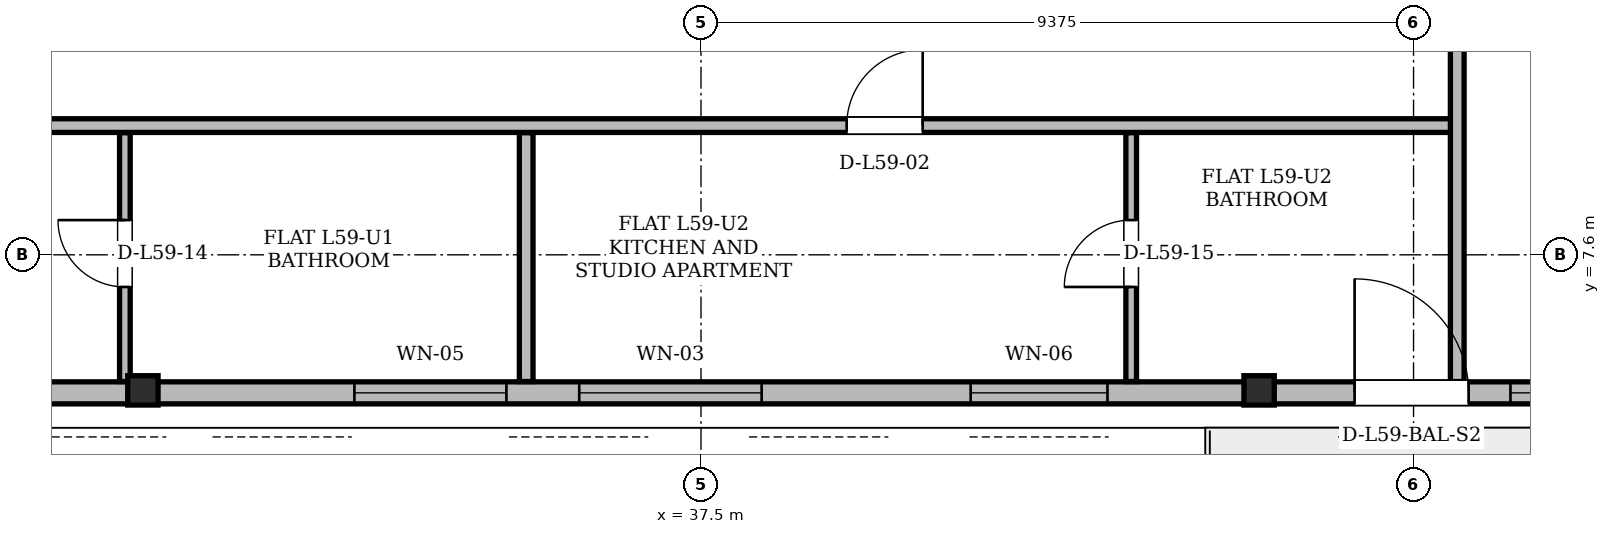
"""IFC4 building model, lengths in metres.
Left out: names, types, materials, properties, quantities, classifications, styles, units other than length and angle.
Written with IfcOpenShell. Run it as: python <this file> out.ifc"""

import sys

from ifc_helpers import new_model, si_unit, direction, frame, frame_2d, origin, origin_2d, place, context, subcontext, project, spatial, rectangle, i_section, extrude, element, fill, save


model = new_model("IFC4")
c1 = context("Model", 3, precision=1e-05, world=origin(), true_north=direction((0.0, 1.0)))
c2 = subcontext(c1, "Body", "Model", "MODEL_VIEW")
j1 = project(units=[si_unit("LENGTHUNIT", "METRE"), si_unit("PLANEANGLEUNIT", "RADIAN")], contexts=[c1])
p1 = place(None, origin())
s1 = spatial("IfcSite", under=j1, at=p1, CompositionType="ELEMENT")
p2 = place(p1, origin())
s2 = spatial("IfcBuilding", under=s1, at=p2, CompositionType="ELEMENT")
p3 = place(p2, frame((0.0, 0.0, 223.5)))
s3 = spatial("IfcBuildingStorey", under=s2, at=p3, CompositionType="ELEMENT", Elevation=223.5)
for number, where, z_axis, x_axis in (
    (1, (30.162, 5.784, 0.004), (-0.003, 0.018, 1.0), (-0.987, -0.162, 0.0)),
    (2, (44.838, 5.784, 0.004), (0.003, 0.018, 1.0), (-0.987, 0.162, 0.0)),
):
    element("IfcColumn", number, at=place(p3, frame(where, z_axis=z_axis, x_axis=x_axis)), inside=s3, PredefinedType="COLUMN", context=c2, shape_type="SweptSolid", body=[
        extrude(i_section(OverallWidth=0.399, OverallDepth=0.386, WebThickness=0.021, FlangeThickness=0.033, at=origin_2d()), origin(), (0.0, 0.0, 1.0), 3.592),
    ])
p4 = place(p3, frame((19.156, 5.784, 0.0), z_axis=(0.0, 0.0, 1.0), x_axis=(1.0, 0.0, 0.0)))
e3 = element("IfcWall", 3, at=p4, inside=s3, PredefinedType="SOLIDWALL", context=c2, shape_type="SweptSolid", body=[
    extrude(rectangle(XDim=36.688, YDim=0.29, at=frame_2d((18.344, 0.0))), origin(), (0.0, 0.0, 1.0), 2.677),
])
p5 = place(p4, frame((3.639, 0.0, 0.0)))
e4 = element("IfcOpeningElement", 4, at=p5, cuts=e3, PredefinedType="OPENING", context=c2, shape_type="SweptSolid", body=[
    extrude(rectangle(XDim=1.5, YDim=2.2, at=frame_2d((0.75, 1.1))), frame((0.0, 0.145, 0.0), z_axis=(0.0, -1.0, 0.0), x_axis=(1.0, 0.0, 0.0)), (0.0, 0.0, 1.0), 0.29),
])
p6 = place(p4, frame((26.944, 0.0, 0.0)))
e5 = element("IfcOpeningElement", 5, at=p6, cuts=e3, PredefinedType="OPENING", context=c2, shape_type="SweptSolid", body=[
    extrude(rectangle(XDim=1.5, YDim=2.2, at=frame_2d((0.75, 1.1))), frame((0.0, 0.145, 0.0), z_axis=(0.0, -1.0, 0.0), x_axis=(1.0, 0.0, 0.0)), (0.0, 0.0, 1.0), 0.29),
])
p7 = place(p4, frame((1.337, 0.0, 0.85)))
e6 = element("IfcOpeningElement", 6, at=p7, cuts=e3, PredefinedType="OPENING", context=c2, shape_type="SweptSolid", body=[
    extrude(rectangle(XDim=1.2, YDim=1.48, at=frame_2d((0.6, 0.74))), frame((0.0, 0.145, 0.0), z_axis=(0.0, -1.0, 0.0), x_axis=(1.0, 0.0, 0.0)), (0.0, 0.0, 1.0), 0.29),
])
p8 = place(p4, frame((7.342, 0.0, 0.85)))
e7 = element("IfcOpeningElement", 7, at=p8, cuts=e3, PredefinedType="OPENING", context=c2, shape_type="SweptSolid", body=[
    extrude(rectangle(XDim=2.2, YDim=1.717, at=frame_2d((1.1, 0.858))), frame((0.0, 0.145, 0.0), z_axis=(0.0, -1.0, 0.0), x_axis=(1.0, 0.0, 0.0)), (0.0, 0.0, 1.0), 0.29),
])
p9 = place(p4, frame((13.784, 0.0, 0.85)))
e8 = element("IfcOpeningElement", 8, at=p9, cuts=e3, PredefinedType="OPENING", context=c2, shape_type="SweptSolid", body=[
    extrude(rectangle(XDim=2.0, YDim=1.717, at=frame_2d((1.0, 0.858))), frame((0.0, 0.145, 0.0), z_axis=(0.0, -1.0, 0.0), x_axis=(1.0, 0.0, 0.0)), (0.0, 0.0, 1.0), 0.29),
])
p10 = place(p4, frame((16.742, 0.0, 0.85)))
e9 = element("IfcOpeningElement", 9, at=p10, cuts=e3, PredefinedType="OPENING", context=c2, shape_type="SweptSolid", body=[
    extrude(rectangle(XDim=2.4, YDim=1.717, at=frame_2d((1.2, 0.858))), frame((0.0, 0.145, 0.0), z_axis=(0.0, -1.0, 0.0), x_axis=(1.0, 0.0, 0.0)), (0.0, 0.0, 1.0), 0.29),
])
p11 = place(p4, frame((21.892, 0.0, 0.85)))
e10 = element("IfcOpeningElement", 10, at=p11, cuts=e3, PredefinedType="OPENING", context=c2, shape_type="SweptSolid", body=[
    extrude(rectangle(XDim=1.8, YDim=1.717, at=frame_2d((0.9, 0.858))), frame((0.0, 0.145, 0.0), z_axis=(0.0, -1.0, 0.0), x_axis=(1.0, 0.0, 0.0)), (0.0, 0.0, 1.0), 0.29),
])
p12 = place(p4, frame((28.994, 0.0, 0.85)))
e11 = element("IfcOpeningElement", 11, at=p12, cuts=e3, PredefinedType="OPENING", context=c2, shape_type="SweptSolid", body=[
    extrude(rectangle(XDim=1.2, YDim=1.48, at=frame_2d((0.6, 0.74))), frame((0.0, 0.145, 0.0), z_axis=(0.0, -1.0, 0.0), x_axis=(1.0, 0.0, 0.0)), (0.0, 0.0, 1.0), 0.29),
])
p13 = place(p4, frame((31.875, 0.0, 0.85)))
e12 = element("IfcOpeningElement", 12, at=p13, cuts=e3, PredefinedType="OPENING", context=c2, shape_type="SweptSolid", body=[
    extrude(rectangle(XDim=2.6, YDim=1.717, at=frame_2d((1.3, 0.858))), frame((0.0, 0.145, 0.0), z_axis=(0.0, -1.0, 0.0), x_axis=(1.0, 0.0, 0.0)), (0.0, 0.0, 1.0), 0.29),
])
p14 = place(p3, frame((25.6, 9.3, 0.0), z_axis=(0.0, 0.0, 1.0), x_axis=(1.0, 0.0, 0.0)))
e13 = element("IfcWall", 13, at=p14, inside=s3, PredefinedType="PARTITIONING", context=c2, shape_type="SweptSolid", body=[
    extrude(rectangle(XDim=21.85, YDim=0.18, at=frame_2d((10.925, 0.0))), origin(), (0.0, 0.0, 1.0), 2.913),
])
p15 = place(p14, frame((2.195, 0.0, 0.0)))
e14 = element("IfcOpeningElement", 14, at=p15, cuts=e13, PredefinedType="OPENING", context=c2, shape_type="SweptSolid", body=[
    extrude(rectangle(XDim=1.0, YDim=2.18, at=frame_2d((0.5, 1.09))), frame((0.0, 0.09, 0.0), z_axis=(0.0, -1.0, 0.0), x_axis=(1.0, 0.0, 0.0)), (0.0, 0.0, 1.0), 0.18),
])
p16 = place(p14, frame((13.817, 0.0, 0.0)))
e15 = element("IfcOpeningElement", 15, at=p16, cuts=e13, PredefinedType="OPENING", context=c2, shape_type="SweptSolid", body=[
    extrude(rectangle(XDim=1.0, YDim=2.18, at=frame_2d((0.5, 1.09))), frame((0.0, 0.09, 0.0), z_axis=(0.0, -1.0, 0.0), x_axis=(1.0, 0.0, 0.0)), (0.0, 0.0, 1.0), 0.18),
])
p17 = place(p3, frame((29.92, 5.933, 0.0), z_axis=(0.0, 0.0, 1.0), x_axis=(0.0, 1.0, 0.0)))
e16 = element("IfcWall", 16, at=p17, inside=s3, PredefinedType="PARTITIONING", context=c2, shape_type="SweptSolid", body=[
    extrude(rectangle(XDim=3.273, YDim=0.14, at=frame_2d((1.636, 0.0))), origin(), (0.0, 0.0, 1.0), 3.38),
])
p18 = place(p17, frame((1.244, 0.0, 0.0)))
e17 = element("IfcOpeningElement", 17, at=p18, cuts=e16, PredefinedType="OPENING", context=c2, shape_type="SweptSolid", body=[
    extrude(rectangle(XDim=0.88, YDim=2.08, at=frame_2d((0.44, 1.04))), frame((0.0, 0.07, 0.0), z_axis=(0.0, -1.0, 0.0), x_axis=(1.0, 0.0, 0.0)), (0.0, 0.0, 1.0), 0.14),
])
p19 = place(p3, frame((35.2, 5.933, 0.0), z_axis=(0.0, 0.0, 1.0), x_axis=(0.0, 1.0, 0.0)))
e18 = element("IfcWall", 18, at=p19, inside=s3, PredefinedType="PARTITIONING", context=c2, shape_type="SweptSolid", body=[
    extrude(rectangle(XDim=3.273, YDim=0.18, at=frame_2d((1.636, 0.0))), origin(), (0.0, 0.0, 1.0), 3.38),
])
p20 = place(p3, frame((43.16, 5.933, 0.0), z_axis=(0.0, 0.0, 1.0), x_axis=(0.0, 1.0, 0.0)))
e19 = element("IfcWall", 19, at=p20, inside=s3, PredefinedType="PARTITIONING", context=c2, shape_type="SweptSolid", body=[
    extrude(rectangle(XDim=3.273, YDim=0.14, at=frame_2d((1.636, 0.0))), origin(), (0.0, 0.0, 1.0), 3.38),
])
p21 = place(p20, frame((1.244, 0.0, 0.0)))
e20 = element("IfcOpeningElement", 20, at=p21, cuts=e19, PredefinedType="OPENING", context=c2, shape_type="SweptSolid", body=[
    extrude(rectangle(XDim=0.88, YDim=2.08, at=frame_2d((0.44, 1.04))), frame((0.0, 0.07, 0.0), z_axis=(0.0, -1.0, 0.0), x_axis=(1.0, 0.0, 0.0)), (0.0, 0.0, 1.0), 0.14),
])
p22 = place(p3, frame((47.45, 5.933, 0.0), z_axis=(0.0, 0.0, 1.0), x_axis=(0.0, 1.0, 0.0)))
e21 = element("IfcWall", 21, at=p22, inside=s3, PredefinedType="PARTITIONING", context=c2, shape_type="SweptSolid", body=[
    extrude(rectangle(XDim=25.267, YDim=0.18, at=frame_2d((12.634, 0.0))), origin(), (0.0, 0.0, 1.0), 2.913),
])
p23 = place(p22, frame((8.989, 0.0, 0.0)))
e22 = element("IfcOpeningElement", 22, at=p23, cuts=e21, PredefinedType="OPENING", context=c2, shape_type="SweptSolid", body=[
    extrude(rectangle(XDim=1.0, YDim=2.18, at=frame_2d((0.5, 1.09))), frame((0.0, 0.09, 0.0), z_axis=(0.0, -1.0, 0.0), x_axis=(1.0, 0.0, 0.0)), (0.0, 0.0, 1.0), 0.18),
])
p24 = place(p22, frame((15.779, 0.0, 0.0)))
e23 = element("IfcOpeningElement", 23, at=p24, cuts=e21, PredefinedType="OPENING", context=c2, shape_type="SweptSolid", body=[
    extrude(rectangle(XDim=1.0, YDim=2.18, at=frame_2d((0.5, 1.09))), frame((0.0, 0.09, 0.0), z_axis=(0.0, -1.0, 0.0), x_axis=(1.0, 0.0, 0.0)), (0.0, 0.0, 1.0), 0.18),
])
p25 = place(p6, origin())
e24 = element("IfcDoor", 24, at=p25, inside=s3, OperationType="SINGLE_SWING_LEFT", PredefinedType="DOOR", context=c2, shape_type="SweptSolid", body=[
    extrude(rectangle(XDim=1.5, YDim=2.2, at=frame_2d((0.75, 1.1))), frame((0.0, 0.025, 0.0), z_axis=(0.0, -1.0, 0.0), x_axis=(1.0, 0.0, 0.0)), (0.0, 0.0, 1.0), 0.05),
])
fill(e5, e24)
p26 = place(p9, origin())
e25 = element("IfcWindow", 25, at=p26, inside=s3, PartitioningType="SINGLE_PANEL", PredefinedType="WINDOW", context=c2, shape_type="SweptSolid", body=[
    extrude(rectangle(XDim=2.0, YDim=1.717, at=frame_2d((1.0, 0.858))), frame((0.0, 0.03, 0.0), z_axis=(0.0, -1.0, 0.0), x_axis=(1.0, 0.0, 0.0)), (0.0, 0.0, 1.0), 0.06),
])
fill(e8, e25)
p27 = place(p10, origin())
e26 = element("IfcWindow", 26, at=p27, inside=s3, PartitioningType="SINGLE_PANEL", PredefinedType="WINDOW", context=c2, shape_type="SweptSolid", body=[
    extrude(rectangle(XDim=2.4, YDim=1.717, at=frame_2d((1.2, 0.858))), frame((0.0, 0.03, 0.0), z_axis=(0.0, -1.0, 0.0), x_axis=(1.0, 0.0, 0.0)), (0.0, 0.0, 1.0), 0.06),
])
fill(e9, e26)
p28 = place(p11, origin())
e27 = element("IfcWindow", 27, at=p28, inside=s3, PartitioningType="SINGLE_PANEL", PredefinedType="WINDOW", context=c2, shape_type="SweptSolid", body=[
    extrude(rectangle(XDim=1.8, YDim=1.717, at=frame_2d((0.9, 0.858))), frame((0.0, 0.03, 0.0), z_axis=(0.0, -1.0, 0.0), x_axis=(1.0, 0.0, 0.0)), (0.0, 0.0, 1.0), 0.06),
])
fill(e10, e27)
p29 = place(p12, origin())
e28 = element("IfcWindow", 28, at=p29, inside=s3, PartitioningType="SINGLE_PANEL", PredefinedType="WINDOW", context=c2, shape_type="SweptSolid", body=[
    extrude(rectangle(XDim=1.2, YDim=1.48, at=frame_2d((0.6, 0.74))), frame((0.0, 0.03, 0.0), z_axis=(0.0, -1.0, 0.0), x_axis=(1.0, 0.0, 0.0)), (0.0, 0.0, 1.0), 0.06),
])
fill(e11, e28)
p30 = place(p16, origin())
e29 = element("IfcDoor", 29, at=p30, inside=s3, OperationType="SINGLE_SWING_RIGHT", PredefinedType="DOOR", context=c2, shape_type="SweptSolid", body=[
    extrude(rectangle(XDim=1.0, YDim=2.18, at=frame_2d((0.5, 1.09))), frame((0.0, 0.025, 0.0), z_axis=(0.0, -1.0, 0.0), x_axis=(1.0, 0.0, 0.0)), (0.0, 0.0, 1.0), 0.05),
])
fill(e15, e29)
p31 = place(p18, origin())
e30 = element("IfcDoor", 30, at=p31, inside=s3, OperationType="SINGLE_SWING_RIGHT", PredefinedType="DOOR", context=c2, shape_type="SweptSolid", body=[
    extrude(rectangle(XDim=0.88, YDim=2.08, at=frame_2d((0.44, 1.04))), frame((0.0, 0.025, 0.0), z_axis=(0.0, -1.0, 0.0), x_axis=(1.0, 0.0, 0.0)), (0.0, 0.0, 1.0), 0.05),
])
fill(e17, e30)
p32 = place(p21, origin())
e31 = element("IfcDoor", 31, at=p32, inside=s3, OperationType="SINGLE_SWING_LEFT", PredefinedType="DOOR", context=c2, shape_type="SweptSolid", body=[
    extrude(rectangle(XDim=0.88, YDim=2.08, at=frame_2d((0.44, 1.04))), frame((0.0, 0.025, 0.0), z_axis=(0.0, -1.0, 0.0), x_axis=(1.0, 0.0, 0.0)), (0.0, 0.0, 1.0), 0.05),
])
fill(e20, e31)
save(model, sys.argv[1])
